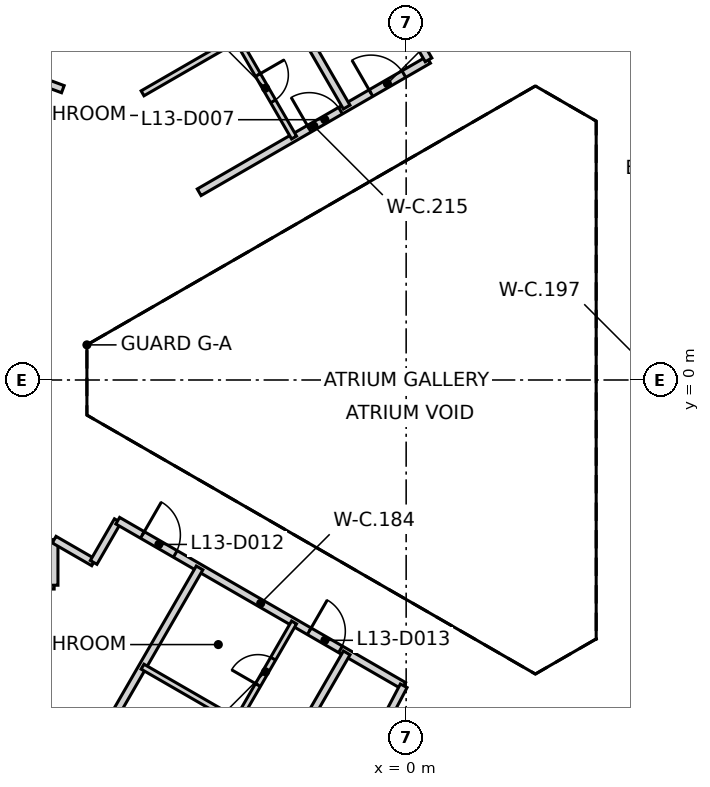
"""IFC4 building model, lengths in metres.
Left out: names, types, materials, properties, quantities, classifications, styles, units other than length and angle.
Written with IfcOpenShell. Run it as: python <this file> out.ifc"""

import sys

from ifc_helpers import new_model, si_unit, direction, frame, frame_2d, origin, place, context, subcontext, project, spatial, rectangle, extrude, element, fill, save


model = new_model("IFC4")
c1 = context("Model", 3, precision=1e-05, world=origin(), true_north=direction((0.0, 1.0)))
c2 = subcontext(c1, "Body", "Model", "MODEL_VIEW")
j1 = project(units=[si_unit("LENGTHUNIT", "METRE"), si_unit("PLANEANGLEUNIT", "RADIAN")], contexts=[c1])
p1 = place(None, origin())
s1 = spatial("IfcSite", under=j1, at=p1, CompositionType="ELEMENT")
p2 = place(p1, origin())
s2 = spatial("IfcBuilding", under=s1, at=p2, CompositionType="ELEMENT")
p3 = place(p2, frame((0.0, 0.0, 60.2)))
s3 = spatial("IfcBuildingStorey", under=s2, at=p3, CompositionType="ELEMENT", Elevation=60.2)
p4 = place(p3, frame((10.42, 6.498, 0.0), z_axis=(0.0, 0.0, 1.0), x_axis=(-0.866021906294, 0.500006057782, 0.0)))
e1 = element("IfcWall", 1, at=p4, inside=s3, PredefinedType="SHEAR", context=c2, shape_type="SweptSolid", body=[
    extrude(rectangle(XDim=11.55, YDim=0.25, at=frame_2d((5.775, 0.0))), origin(), (0.0, 0.0, 1.0), 3.125),
])
p5 = place(p4, frame((10.025, 0.0, 0.0)))
e2 = element("IfcOpeningElement", 2, at=p5, cuts=e1, PredefinedType="OPENING", context=c2, shape_type="SweptSolid", body=[
    extrude(rectangle(XDim=1.2, YDim=2.1, at=frame_2d((0.6, 1.05))), frame((0.0, 0.135, 0.0), z_axis=(0.0, -1.0, 0.0), x_axis=(1.0, 0.0, 0.0)), (0.0, 0.0, 1.0), 0.27),
])
p6 = place(p4, frame((8.725, 0.0, 0.0)))
e3 = element("IfcOpeningElement", 3, at=p6, cuts=e1, PredefinedType="OPENING", context=c2, shape_type="SweptSolid", body=[
    extrude(rectangle(XDim=1.2, YDim=2.1, at=frame_2d((0.6, 1.05))), frame((0.0, 0.135, 0.0), z_axis=(0.0, -1.0, 0.0), x_axis=(1.0, 0.0, 0.0)), (0.0, 0.0, 1.0), 0.27),
])
p7 = place(p3, frame((0.417, -12.273, 0.0), z_axis=(0.0, 0.0, 1.0), x_axis=(0.866021906294, 0.500006057782, 0.0)))
e4 = element("IfcWall", 4, at=p7, inside=s3, PredefinedType="SHEAR", context=c2, shape_type="SweptSolid", body=[
    extrude(rectangle(XDim=11.55, YDim=0.25, at=frame_2d((5.775, 0.0))), origin(), (0.0, 0.0, 1.0), 3.125),
])
p8 = place(p7, frame((10.025, 0.0, 0.0)))
e5 = element("IfcOpeningElement", 5, at=p8, cuts=e4, PredefinedType="OPENING", context=c2, shape_type="SweptSolid", body=[
    extrude(rectangle(XDim=1.2, YDim=2.1, at=frame_2d((0.6, 1.05))), frame((0.0, 0.135, 0.0), z_axis=(0.0, -1.0, 0.0), x_axis=(1.0, 0.0, 0.0)), (0.0, 0.0, 1.0), 0.27),
])
p9 = place(p7, frame((8.725, 0.0, 0.0)))
e6 = element("IfcOpeningElement", 6, at=p9, cuts=e4, PredefinedType="OPENING", context=c2, shape_type="SweptSolid", body=[
    extrude(rectangle(XDim=1.2, YDim=2.1, at=frame_2d((0.6, 1.05))), frame((0.0, 0.135, 0.0), z_axis=(0.0, -1.0, 0.0), x_axis=(1.0, 0.0, 0.0)), (0.0, 0.0, 1.0), 0.27),
])
p10 = place(p3, frame((-16.026, 10.247, 0.0), z_axis=(0.0, 0.0, 1.0), x_axis=(0.937540909117, -0.347875040397, 0.0)))
e7 = element("IfcWall", 7, at=p10, inside=s3, PredefinedType="PARTITIONING", context=c2, shape_type="SweptSolid", body=[
    extrude(rectangle(XDim=7.459, YDim=0.2, at=frame_2d((3.729, 0.0))), origin(), (0.0, 0.0, 1.0), 3.125),
])
p11 = place(p10, frame((3.396, 0.0, 0.0)))
e8 = element("IfcOpeningElement", 8, at=p11, cuts=e7, PredefinedType="OPENING", context=c2, shape_type="SweptSolid", body=[
    extrude(rectangle(XDim=0.95, YDim=2.1, at=frame_2d((0.475, 1.05))), frame((0.0, 0.11, 0.0), z_axis=(0.0, -1.0, 0.0), x_axis=(1.0, 0.0, 0.0)), (0.0, 0.0, 1.0), 0.22),
])
p12 = place(p3, frame((-10.652, -5.4, 0.0), z_axis=(0.0, 0.0, 1.0), x_axis=(1.0, 0.0, 0.0)))
e9 = element("IfcWall", 9, at=p12, inside=s3, PredefinedType="PARTITIONING", context=c2, shape_type="SweptSolid", body=[
    extrude(rectangle(XDim=1.39, YDim=0.2, at=frame_2d((0.695, 0.0))), origin(), (0.0, 0.0, 1.0), 3.125),
])
for number, where, z_axis, x_axis in (
    (10, (-9.262, -5.4, 0.0), (0.0, 0.0, 1.0), (0.0, 1.0, 0.0)),
    (11, (-9.262, -4.2, 0.0), (0.0, 0.0, 1.0), (0.866, -0.5, 0.0)),
):
    element("IfcWall", number, at=place(p3, frame(where, z_axis=z_axis, x_axis=x_axis)), inside=s3, PredefinedType="PARTITIONING", context=c2, shape_type="SweptSolid", body=[
        extrude(rectangle(XDim=1.2, YDim=0.2, at=frame_2d((0.6, 0.0))), origin(), (0.0, 0.0, 1.0), 3.125),
    ])
p13 = place(p3, frame((-8.223, -4.8, 0.0), z_axis=(0.0, 0.0, 1.0), x_axis=(0.499866914522, 0.866102227088, 0.0)))
e12 = element("IfcWall", 12, at=p13, inside=s3, PredefinedType="PARTITIONING", context=c2, shape_type="SweptSolid", body=[
    extrude(rectangle(XDim=1.268, YDim=0.2, at=frame_2d((0.634, 0.0))), origin(), (0.0, 0.0, 1.0), 3.125),
])
p14 = place(p3, frame((-7.589, -3.702, 0.0), z_axis=(0.0, 0.0, 1.0), x_axis=(0.865995139556, -0.500052415518, 0.0)))
e13 = element("IfcWall", 13, at=p14, inside=s3, PredefinedType="PARTITIONING", context=c2, shape_type="SweptSolid", body=[
    extrude(rectangle(XDim=8.689, YDim=0.2, at=frame_2d((4.344, 0.0))), origin(), (0.0, 0.0, 1.0), 3.125),
])
p15 = place(p14, frame((0.749, 0.0, 0.0)))
e14 = element("IfcOpeningElement", 14, at=p15, cuts=e13, PredefinedType="OPENING", context=c2, shape_type="SweptSolid", body=[
    extrude(rectangle(XDim=1.0, YDim=2.1, at=frame_2d((0.5, 1.05))), frame((0.0, 0.11, 0.0), z_axis=(0.0, -1.0, 0.0), x_axis=(1.0, 0.0, 0.0)), (0.0, 0.0, 1.0), 0.22),
])
p16 = place(p14, frame((5.819, 0.0, 0.0)))
e15 = element("IfcOpeningElement", 15, at=p16, cuts=e13, PredefinedType="OPENING", context=c2, shape_type="SweptSolid", body=[
    extrude(rectangle(XDim=0.95, YDim=2.1, at=frame_2d((0.475, 1.05))), frame((0.0, 0.11, 0.0), z_axis=(0.0, -1.0, 0.0), x_axis=(1.0, 0.0, 0.0)), (0.0, 0.0, 1.0), 0.22),
])
p17 = place(p3, frame((-5.446, 4.94, 0.0), z_axis=(0.0, 0.0, 1.0), x_axis=(0.866096332545, 0.499877127655, 0.0)))
e16 = element("IfcWall", 16, at=p17, inside=s3, PredefinedType="PARTITIONING", context=c2, shape_type="SweptSolid", body=[
    extrude(rectangle(XDim=6.969, YDim=0.2, at=frame_2d((3.484, 0.0))), origin(), (0.0, 0.0, 1.0), 3.125),
])
p18 = place(p17, frame((5.219, 0.0, 0.0)))
e17 = element("IfcOpeningElement", 17, at=p18, cuts=e16, PredefinedType="OPENING", context=c2, shape_type="SweptSolid", body=[
    extrude(rectangle(XDim=1.0, YDim=2.1, at=frame_2d((0.5, 1.05))), frame((0.0, 0.11, 0.0), z_axis=(0.0, -1.0, 0.0), x_axis=(1.0, 0.0, 0.0)), (0.0, 0.0, 1.0), 0.22),
])
p19 = place(p17, frame((3.344, 0.0, 0.0)))
e18 = element("IfcOpeningElement", 18, at=p19, cuts=e16, PredefinedType="OPENING", context=c2, shape_type="SweptSolid", body=[
    extrude(rectangle(XDim=0.95, YDim=2.1, at=frame_2d((0.475, 1.05))), frame((0.0, 0.11, 0.0), z_axis=(0.0, -1.0, 0.0), x_axis=(1.0, 0.0, 0.0)), (0.0, 0.0, 1.0), 0.22),
])
p20 = place(p3, frame((-2.162, -12.041, 0.0), z_axis=(0.0, 0.0, 1.0), x_axis=(0.464956890881, 0.885333321197, 0.0)))
e19 = element("IfcWall", 19, at=p20, inside=s3, PredefinedType="PARTITIONING", context=c2, shape_type="SweptSolid", body=[
    extrude(rectangle(XDim=4.512, YDim=0.2, at=frame_2d((2.256, 0.0))), origin(), (0.0, 0.0, 1.0), 3.125),
])
p21 = place(p20, frame((1.756, 0.0, 0.0)))
e20 = element("IfcOpeningElement", 20, at=p21, cuts=e19, PredefinedType="OPENING", context=c2, shape_type="SweptSolid", body=[
    extrude(rectangle(XDim=1.0, YDim=2.1, at=frame_2d((0.5, 1.05))), frame((0.0, 0.11, 0.0), z_axis=(0.0, -1.0, 0.0), x_axis=(1.0, 0.0, 0.0)), (0.0, 0.0, 1.0), 0.22),
])
p22 = place(p3, frame((-0.045, 9.521, 0.0), z_axis=(0.0, 0.0, 1.0), x_axis=(0.500094716449, -0.865970712311, 0.0)))
e21 = element("IfcWall", 21, at=p22, inside=s3, PredefinedType="PARTITIONING", context=c2, shape_type="SweptSolid", body=[
    extrude(rectangle(XDim=1.268, YDim=0.2, at=frame_2d((0.634, 0.0))), origin(), (0.0, 0.0, 1.0), 3.125),
])
p23 = place(p3, frame((-14.148, -20.035, 0.0), z_axis=(0.0, 0.0, 1.0), x_axis=(0.500005855417, 0.866022023131, 0.0)))
e22 = element("IfcWall", 22, at=p23, inside=s3, PredefinedType="PARTITIONING", context=c2, shape_type="SweptSolid", body=[
    extrude(rectangle(XDim=17.425, YDim=0.2, at=frame_2d((8.712, 0.0))), origin(), (0.0, 0.0, 1.0), 3.125),
])
p24 = place(p3, frame((-10.276, 22.271, 0.0), z_axis=(0.0, 0.0, 1.0), x_axis=(0.499975954304, -0.866039286129, 0.0)))
e23 = element("IfcWall", 23, at=p24, inside=s3, PredefinedType="PARTITIONING", context=c2, shape_type="SweptSolid", body=[
    extrude(rectangle(XDim=17.424, YDim=0.2, at=frame_2d((8.712, 0.0))), origin(), (0.0, 0.0, 1.0), 3.125),
])
p25 = place(p3, frame((-10.276, -22.271, 0.0), z_axis=(0.0, 0.0, 1.0), x_axis=(0.49999372146, 0.866029028671, 0.0)))
e24 = element("IfcWall", 24, at=p25, inside=s3, PredefinedType="PARTITIONING", context=c2, shape_type="SweptSolid", body=[
    extrude(rectangle(XDim=17.425, YDim=0.2, at=frame_2d((8.712, 0.0))), origin(), (0.0, 0.0, 1.0), 3.125),
])
for number, where, z_axis, x_axis in (
    (25, (-6.936, -7.543, 0.0), (0.0, 0.0, 1.0), (0.866, -0.5, 0.0)),
    (26, (-6.936, 7.543, 0.0), (0.0, 0.0, 1.0), (0.866, 0.5, 0.0)),
):
    element("IfcWall", number, at=place(p3, frame(where, z_axis=z_axis, x_axis=x_axis)), inside=s3, PredefinedType="PARTITIONING", context=c2, shape_type="SweptSolid", body=[
        extrude(rectangle(XDim=2.871, YDim=0.15, at=frame_2d((1.436, 0.0))), origin(), (0.0, 0.0, 1.0), 3.125),
    ])
p26 = place(p3, frame((-4.449, -8.978, 0.0), z_axis=(0.0, 0.0, 1.0), x_axis=(0.499745940409, 0.866172035478, 0.0)))
e27 = element("IfcWall", 27, at=p26, inside=s3, PredefinedType="PARTITIONING", context=c2, shape_type="SweptSolid", body=[
    extrude(rectangle(XDim=3.0, YDim=0.15, at=frame_2d((1.5, 0.0))), origin(), (0.0, 0.0, 1.0), 3.125),
])
p27 = place(p26, frame((1.1, 0.0, 0.0)))
e28 = element("IfcOpeningElement", 28, at=p27, cuts=e27, PredefinedType="OPENING", context=c2, shape_type="SweptSolid", body=[
    extrude(rectangle(XDim=0.8, YDim=2.1, at=frame_2d((0.4, 1.05))), frame((0.0, 0.085, 0.0), z_axis=(0.0, -1.0, 0.0), x_axis=(1.0, 0.0, 0.0)), (0.0, 0.0, 1.0), 0.17),
])
p28 = place(p3, frame((-4.449, 8.978, 0.0), z_axis=(0.0, 0.0, 1.0), x_axis=(0.499745940409, -0.866172035478, 0.0)))
e29 = element("IfcWall", 29, at=p28, inside=s3, PredefinedType="PARTITIONING", context=c2, shape_type="SweptSolid", body=[
    extrude(rectangle(XDim=3.0, YDim=0.15, at=frame_2d((1.5, 0.0))), origin(), (0.0, 0.0, 1.0), 3.125),
])
p29 = place(p28, frame((1.1, 0.0, 0.0)))
e30 = element("IfcOpeningElement", 30, at=p29, cuts=e29, PredefinedType="OPENING", context=c2, shape_type="SweptSolid", body=[
    extrude(rectangle(XDim=0.8, YDim=2.1, at=frame_2d((0.4, 1.05))), frame((0.0, 0.085, 0.0), z_axis=(0.0, -1.0, 0.0), x_axis=(1.0, 0.0, 0.0)), (0.0, 0.0, 1.0), 0.17),
])
p30 = place(p18, origin())
e31 = element("IfcDoor", 31, at=p30, inside=s3, OperationType="SINGLE_SWING_LEFT", PredefinedType="DOOR", context=c2, shape_type="SweptSolid", body=[
    extrude(rectangle(XDim=1.0, YDim=2.1, at=frame_2d((0.5, 1.05))), frame((0.0, 0.025, 0.0), z_axis=(0.0, -1.0, 0.0), x_axis=(1.0, 0.0, 0.0)), (0.0, 0.0, 1.0), 0.05),
])
fill(e17, e31)
p31 = place(p19, origin())
e32 = element("IfcDoor", 32, at=p31, inside=s3, OperationType="SINGLE_SWING_LEFT", PredefinedType="DOOR", context=c2, shape_type="SweptSolid", body=[
    extrude(rectangle(XDim=0.95, YDim=2.1, at=frame_2d((0.475, 1.05))), frame((0.0, 0.025, 0.0), z_axis=(0.0, -1.0, 0.0), x_axis=(1.0, 0.0, 0.0)), (0.0, 0.0, 1.0), 0.05),
])
fill(e18, e32)
p32 = place(p29, frame((0.8, 0.0, 0.0), z_axis=(0.0, 0.0, 1.0), x_axis=(-1.0, 0.0, 0.0)))
e33 = element("IfcDoor", 33, at=p32, inside=s3, OperationType="SINGLE_SWING_LEFT", PredefinedType="DOOR", context=c2, shape_type="SweptSolid", body=[
    extrude(rectangle(XDim=0.8, YDim=2.1, at=frame_2d((0.4, 1.05))), frame((0.0, 0.025, 0.0), z_axis=(0.0, -1.0, 0.0), x_axis=(1.0, 0.0, 0.0)), (0.0, 0.0, 1.0), 0.05),
])
fill(e30, e33)
p33 = place(p15, frame((1.0, 0.0, 0.0), z_axis=(0.0, 0.0, 1.0), x_axis=(-1.0, 0.0, 0.0)))
e34 = element("IfcDoor", 34, at=p33, inside=s3, OperationType="SINGLE_SWING_LEFT", PredefinedType="DOOR", context=c2, shape_type="SweptSolid", body=[
    extrude(rectangle(XDim=1.0, YDim=2.1, at=frame_2d((0.5, 1.05))), frame((0.0, 0.025, 0.0), z_axis=(0.0, -1.0, 0.0), x_axis=(1.0, 0.0, 0.0)), (0.0, 0.0, 1.0), 0.05),
])
fill(e14, e34)
p34 = place(p16, frame((0.95, 0.0, 0.0), z_axis=(0.0, 0.0, 1.0), x_axis=(-1.0, 0.0, 0.0)))
e35 = element("IfcDoor", 35, at=p34, inside=s3, OperationType="SINGLE_SWING_LEFT", PredefinedType="DOOR", context=c2, shape_type="SweptSolid", body=[
    extrude(rectangle(XDim=0.95, YDim=2.1, at=frame_2d((0.475, 1.05))), frame((0.0, 0.025, 0.0), z_axis=(0.0, -1.0, 0.0), x_axis=(1.0, 0.0, 0.0)), (0.0, 0.0, 1.0), 0.05),
])
fill(e15, e35)
p35 = place(p27, origin())
e36 = element("IfcDoor", 36, at=p35, inside=s3, OperationType="SINGLE_SWING_LEFT", PredefinedType="DOOR", context=c2, shape_type="SweptSolid", body=[
    extrude(rectangle(XDim=0.8, YDim=2.1, at=frame_2d((0.4, 1.05))), frame((0.0, 0.025, 0.0), z_axis=(0.0, -1.0, 0.0), x_axis=(1.0, 0.0, 0.0)), (0.0, 0.0, 1.0), 0.05),
])
fill(e28, e36)
save(model, sys.argv[1])
